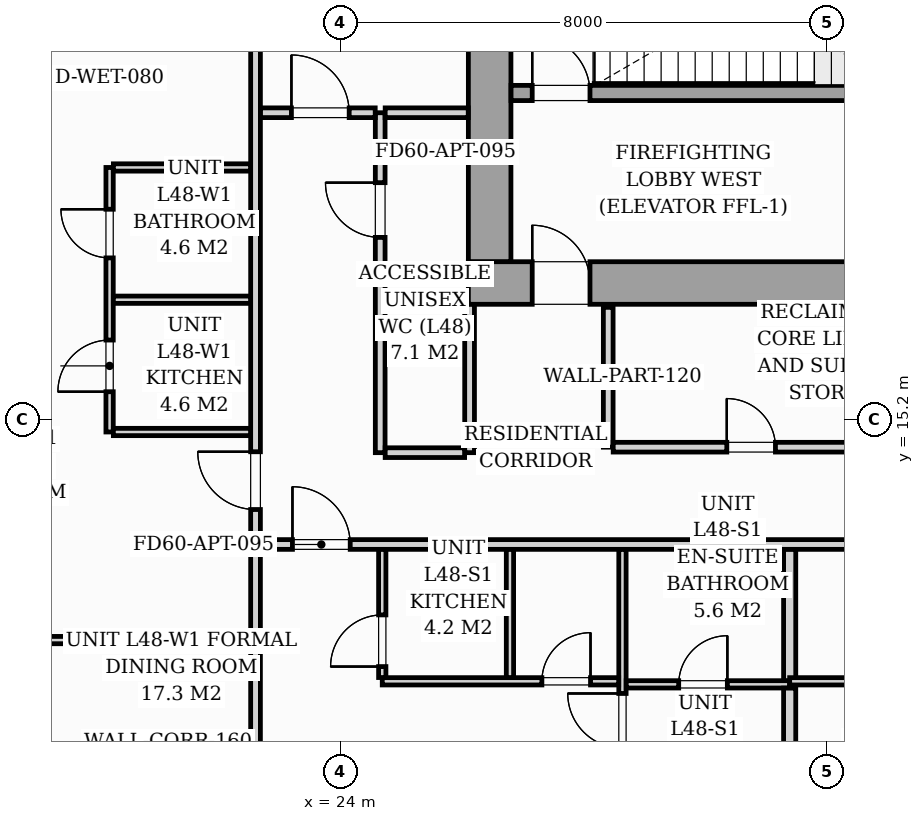
"""IFC4 building model, lengths in metres.
Left out: names, types, materials, properties, quantities, classifications, styles, units other than length and angle.
Written with IfcOpenShell. Run it as: python <this file> out.ifc"""

import sys

from ifc_helpers import new_model, si_unit, direction, frame, frame_2d, origin, origin_2d, place, context, subcontext, project, spatial, rectangle, i_section, extrude, source, transform, mapped, element, fill, save


model = new_model("IFC4")
c1 = context("Model", 3, precision=1e-05, world=origin(), true_north=direction((0.0, 1.0)))
c2 = subcontext(c1, "Body", "Model", "MODEL_VIEW")
j1 = project(units=[si_unit("LENGTHUNIT", "METRE"), si_unit("PLANEANGLEUNIT", "RADIAN")], contexts=[c1])
p1 = place(None, origin())
s1 = spatial("IfcSite", under=j1, at=p1, CompositionType="ELEMENT")
p2 = place(p1, origin())
s2 = spatial("IfcBuilding", under=s1, at=p2, CompositionType="ELEMENT")
p3 = place(p2, frame((0.0, 0.0, 167.8)))
s3 = spatial("IfcBuildingStorey", under=s2, at=p3, CompositionType="ELEMENT", Elevation=167.8)
m1 = source(origin(), c2, "Body", "SweptSolid", [
    extrude(i_section(OverallWidth=0.416, OverallDepth=0.446, WebThickness=0.039, FlangeThickness=0.063, FilletRadius=0.018, at=origin_2d()), origin(), (0.0, 0.0, 1.0), 5.196),
])
p4 = place(p3, frame((26.4, 17.4, 0.002), z_axis=(0.0, 0.0, 1.0), x_axis=(1.0, 0.0, 0.0)))
e1 = element("IfcColumn", 1, at=p4, inside=s3, PredefinedType="PILASTER", context=c2, shape_type="MappedRepresentation", body=[
    mapped(m1, transform((0.0, 0.0, 0.0), scale=1.0)),
])
p5 = place(p3, frame((26.1, 17.45, 0.0), z_axis=(0.0, 0.0, 1.0), x_axis=(1.0, 0.0, 0.0)))
e2 = element("IfcWall", 2, at=p5, inside=s3, PredefinedType="SHEAR", context=c2, shape_type="SweptSolid", body=[
    extrude(rectangle(XDim=19.8, YDim=0.7, at=frame_2d((9.9, 0.0))), origin(), (0.0, 0.0, 1.0), 5.2),
])
p6 = place(p5, frame((1.05, 0.0, 0.0)))
e3 = element("IfcOpeningElement", 3, at=p6, cuts=e2, PredefinedType="OPENING", context=c2, shape_type="SweptSolid", body=[
    extrude(rectangle(XDim=0.95, YDim=2.06, at=frame_2d((0.475, 1.03))), frame((0.0, 0.36, 0.0), z_axis=(0.0, -1.0, 0.0), x_axis=(1.0, 0.0, 0.0)), (0.0, 0.0, 1.0), 0.72),
])
p7 = place(p5, frame((9.48, 0.0, 0.0)))
e4 = element("IfcOpeningElement", 4, at=p7, cuts=e2, PredefinedType="OPENING", context=c2, shape_type="SweptSolid", body=[
    extrude(rectangle(XDim=0.9, YDim=2.06, at=frame_2d((0.45, 1.03))), frame((0.0, 0.36, 0.0), z_axis=(0.0, -1.0, 0.0), x_axis=(1.0, 0.0, 0.0)), (0.0, 0.0, 1.0), 0.72),
])
p8 = place(p5, frame((17.65, 0.0, 0.0)))
e5 = element("IfcOpeningElement", 5, at=p8, cuts=e2, PredefinedType="OPENING", context=c2, shape_type="SweptSolid", body=[
    extrude(rectangle(XDim=0.95, YDim=2.06, at=frame_2d((0.475, 1.03))), frame((0.0, 0.36, 0.0), z_axis=(0.0, -1.0, 0.0), x_axis=(1.0, 0.0, 0.0)), (0.0, 0.0, 1.0), 0.72),
])
p9 = place(p3, frame((26.45, 17.802, 0.0), z_axis=(0.0, 0.0, 1.0), x_axis=(0.0, 1.0, 0.0)))
e6 = element("IfcWall", 6, at=p9, inside=s3, PredefinedType="SHEAR", context=c2, shape_type="SweptSolid", body=[
    extrude(rectangle(XDim=5.796, YDim=0.7, at=frame_2d((2.898, 0.0))), origin(), (0.0, 0.0, 1.0), 5.2),
])
p10 = place(p3, frame((26.802, 20.575, 0.0), z_axis=(0.0, 0.0, 1.0), x_axis=(1.0, 0.0, 0.0)))
e7 = element("IfcWall", 7, at=p10, inside=s3, PredefinedType="SOLIDWALL", context=c2, shape_type="SweptSolid", body=[
    extrude(rectangle(XDim=8.148, YDim=0.25, at=frame_2d((4.074, 0.0))), origin(), (0.0, 0.0, 1.0), 5.2),
])
p11 = place(p10, frame((0.348, 0.0, 0.0)))
e8 = element("IfcOpeningElement", 8, at=p11, cuts=e7, PredefinedType="OPENING", context=c2, shape_type="SweptSolid", body=[
    extrude(rectangle(XDim=0.95, YDim=2.06, at=frame_2d((0.475, 1.03))), frame((0.0, 0.135, 0.0), z_axis=(0.0, -1.0, 0.0), x_axis=(1.0, 0.0, 0.0)), (0.0, 0.0, 1.0), 0.27),
])
p12 = place(p3, frame((28.4, 14.75, 0.0), z_axis=(0.0, 0.0, 1.0), x_axis=(0.0, 1.0, 0.0)))
e9 = element("IfcWall", 9, at=p12, inside=s3, PredefinedType="PARTITIONING", context=c2, shape_type="SweptSolid", body=[
    extrude(rectangle(XDim=2.3, YDim=0.16, at=frame_2d((1.15, 0.0))), origin(), (0.0, 0.0, 1.0), 4.94),
])
p13 = place(p3, frame((28.482, 14.75, 0.0), z_axis=(0.0, 0.0, 1.0), x_axis=(1.0, 0.0, 0.0)))
e10 = element("IfcWall", 10, at=p13, inside=s3, PredefinedType="PARTITIONING", context=c2, shape_type="SweptSolid", body=[
    extrude(rectangle(XDim=4.516, YDim=0.16, at=frame_2d((2.258, 0.0))), origin(), (0.0, 0.0, 1.0), 4.94),
])
p14 = place(p13, frame((1.868, 0.0, 0.0)))
e11 = element("IfcOpeningElement", 11, at=p14, cuts=e10, PredefinedType="OPENING", context=c2, shape_type="SweptSolid", body=[
    extrude(rectangle(XDim=0.8, YDim=2.05, at=frame_2d((0.4, 1.025))), frame((0.0, 0.09, 0.0), z_axis=(0.0, -1.0, 0.0), x_axis=(1.0, 0.0, 0.0)), (0.0, 0.0, 1.0), 0.18),
])
p15 = place(p3, frame((22.6, 13.15, 0.0), z_axis=(0.0, 0.0, 1.0), x_axis=(1.0, 0.0, 0.0)))
e12 = element("IfcWall", 12, at=p15, inside=s3, PredefinedType="PARTITIONING", context=c2, shape_type="SweptSolid", body=[
    extrude(rectangle(XDim=23.28, YDim=0.16, at=frame_2d((11.64, 0.0))), origin(), (0.0, 0.0, 1.0), 4.94),
])
p16 = place(p15, frame((0.607, 0.0, 0.0)))
e13 = element("IfcOpeningElement", 13, at=p16, cuts=e12, PredefinedType="OPENING", context=c2, shape_type="SweptSolid", body=[
    extrude(rectangle(XDim=0.95, YDim=2.06, at=frame_2d((0.475, 1.03))), frame((0.0, 0.09, 0.0), z_axis=(0.0, -1.0, 0.0), x_axis=(1.0, 0.0, 0.0)), (0.0, 0.0, 1.0), 0.18),
])
p17 = place(p15, frame((11.717, 0.0, 0.0)))
e14 = element("IfcOpeningElement", 14, at=p17, cuts=e12, PredefinedType="OPENING", context=c2, shape_type="SweptSolid", body=[
    extrude(rectangle(XDim=0.95, YDim=2.06, at=frame_2d((0.475, 1.03))), frame((0.0, 0.09, 0.0), z_axis=(0.0, -1.0, 0.0), x_axis=(1.0, 0.0, 0.0)), (0.0, 0.0, 1.0), 0.18),
])
p18 = place(p3, frame((22.6, 6.74, 0.0), z_axis=(0.0, 0.0, 1.0), x_axis=(0.0, 1.0, 0.0)))
e15 = element("IfcWall", 15, at=p18, inside=s3, PredefinedType="PARTITIONING", context=c2, shape_type="SweptSolid", body=[
    extrude(rectangle(XDim=6.329, YDim=0.16, at=frame_2d((3.164, 0.0))), origin(), (0.0, 0.0, 1.0), 4.94),
])
p19 = place(p3, frame((22.6, 13.232, 0.0), z_axis=(0.0, 0.0, 1.0), x_axis=(0.0, 1.0, 0.0)))
e16 = element("IfcWall", 16, at=p19, inside=s3, PredefinedType="PARTITIONING", context=c2, shape_type="SweptSolid", body=[
    extrude(rectangle(XDim=11.832, YDim=0.16, at=frame_2d((5.916, 0.0))), origin(), (0.0, 0.0, 1.0), 4.94),
])
p20 = place(p19, frame((0.493, 0.0, 0.0)))
e17 = element("IfcOpeningElement", 17, at=p20, cuts=e16, PredefinedType="OPENING", context=c2, shape_type="SweptSolid", body=[
    extrude(rectangle(XDim=0.95, YDim=2.06, at=frame_2d((0.475, 1.03))), frame((0.0, 0.09, 0.0), z_axis=(0.0, -1.0, 0.0), x_axis=(1.0, 0.0, 0.0)), (0.0, 0.0, 1.0), 0.18),
])
p21 = place(p3, frame((28.634, 7.503, 0.0), z_axis=(0.0, 0.0, 1.0), x_axis=(0.0, 1.0, 0.0)))
e18 = element("IfcWall", 18, at=p21, inside=s3, PredefinedType="PARTITIONING", context=c2, shape_type="SweptSolid", body=[
    extrude(rectangle(XDim=5.565, YDim=0.12, at=frame_2d((2.782, 0.0))), origin(), (0.0, 0.0, 1.0), 4.94),
])
p22 = place(p21, frame((2.297, 0.0, 0.0)))
e19 = element("IfcOpeningElement", 19, at=p22, cuts=e18, PredefinedType="OPENING", context=c2, shape_type="SweptSolid", body=[
    extrude(rectangle(XDim=0.9, YDim=2.05, at=frame_2d((0.45, 1.025))), frame((0.0, 0.07, 0.0), z_axis=(0.0, -1.0, 0.0), x_axis=(1.0, 0.0, 0.0)), (0.0, 0.0, 1.0), 0.14),
])
p23 = place(p3, frame((24.684, 10.9, 0.0), z_axis=(0.0, 0.0, 1.0), x_axis=(1.0, 0.0, 0.0)))
e20 = element("IfcWall", 20, at=p23, inside=s3, PredefinedType="PARTITIONING", context=c2, shape_type="SweptSolid", body=[
    extrude(rectangle(XDim=3.888, YDim=0.12, at=frame_2d((1.944, 0.0))), origin(), (0.0, 0.0, 1.0), 4.94),
])
p24 = place(p23, frame((2.625, 0.0, 0.0)))
e21 = element("IfcOpeningElement", 21, at=p24, cuts=e20, PredefinedType="OPENING", context=c2, shape_type="SweptSolid", body=[
    extrude(rectangle(XDim=0.8, YDim=2.02, at=frame_2d((0.4, 1.01))), frame((0.0, 0.07, 0.0), z_axis=(0.0, -1.0, 0.0), x_axis=(1.0, 0.0, 0.0)), (0.0, 0.0, 1.0), 0.14),
])
p25 = place(p3, frame((26.784, 10.962, 0.0), z_axis=(0.0, 0.0, 1.0), x_axis=(0.0, 1.0, 0.0)))
e22 = element("IfcWall", 22, at=p25, inside=s3, PredefinedType="PARTITIONING", context=c2, shape_type="SweptSolid", body=[
    extrude(rectangle(XDim=2.106, YDim=0.12, at=frame_2d((1.053, 0.0))), origin(), (0.0, 0.0, 1.0), 4.94),
])
p26 = place(p3, frame((24.684, 10.962, 0.0), z_axis=(0.0, 0.0, 1.0), x_axis=(0.0, 1.0, 0.0)))
e23 = element("IfcWall", 23, at=p26, inside=s3, PredefinedType="PARTITIONING", context=c2, shape_type="SweptSolid", body=[
    extrude(rectangle(XDim=2.106, YDim=0.12, at=frame_2d((1.053, 0.0))), origin(), (0.0, 0.0, 1.0), 4.94),
])
p27 = place(p26, frame((0.18, 0.0, 0.0)))
e24 = element("IfcOpeningElement", 24, at=p27, cuts=e23, PredefinedType="OPENING", context=c2, shape_type="SweptSolid", body=[
    extrude(rectangle(XDim=0.85, YDim=2.05, at=frame_2d((0.425, 1.025))), frame((0.0, 0.07, 0.0), z_axis=(0.0, -1.0, 0.0), x_axis=(1.0, 0.0, 0.0)), (0.0, 0.0, 1.0), 0.14),
])
p28 = place(p3, frame((28.696, 10.85, 0.0), z_axis=(0.0, 0.0, 1.0), x_axis=(1.0, 0.0, 0.0)))
e25 = element("IfcWall", 25, at=p28, inside=s3, PredefinedType="PARTITIONING", context=c2, shape_type="SweptSolid", body=[
    extrude(rectangle(XDim=2.688, YDim=0.12, at=frame_2d((1.344, 0.0))), origin(), (0.0, 0.0, 1.0), 4.94),
])
p29 = place(p28, frame((0.863, 0.0, 0.0)))
e26 = element("IfcOpeningElement", 26, at=p29, cuts=e25, PredefinedType="OPENING", context=c2, shape_type="SweptSolid", body=[
    extrude(rectangle(XDim=0.8, YDim=2.02, at=frame_2d((0.4, 1.01))), frame((0.0, 0.07, 0.0), z_axis=(0.0, -1.0, 0.0), x_axis=(1.0, 0.0, 0.0)), (0.0, 0.0, 1.0), 0.14),
])
p30 = place(p3, frame((31.384, 7.768, 0.0), z_axis=(0.0, 0.0, 1.0), x_axis=(0.0, 1.0, 0.0)))
e27 = element("IfcWall", 27, at=p30, inside=s3, PredefinedType="PARTITIONING", context=c2, shape_type="SweptSolid", body=[
    extrude(rectangle(XDim=3.02, YDim=0.2, at=frame_2d((1.51, 0.0))), origin(), (0.0, 0.0, 1.0), 4.94),
])
p31 = place(p3, frame((31.384, 10.912, 0.0), z_axis=(0.0, 0.0, 1.0), x_axis=(0.0, 1.0, 0.0)))
e28 = element("IfcWall", 28, at=p31, inside=s3, PredefinedType="PARTITIONING", context=c2, shape_type="SweptSolid", body=[
    extrude(rectangle(XDim=2.156, YDim=0.2, at=frame_2d((1.078, 0.0))), origin(), (0.0, 0.0, 1.0), 4.94),
])
p32 = place(p3, frame((31.384, 10.9, 0.0), z_axis=(0.0, 0.0, 1.0), x_axis=(1.0, 0.0, 0.0)))
e29 = element("IfcWall", 29, at=p32, inside=s3, PredefinedType="PARTITIONING", context=c2, shape_type="SweptSolid", body=[
    extrude(rectangle(XDim=2.949, YDim=0.12, at=frame_2d((1.475, 0.0))), origin(), (0.0, 0.0, 1.0), 4.94),
])
p33 = place(p3, frame((20.2, 15.0, 0.0), z_axis=(0.0, 0.0, 1.0), x_axis=(0.0, 1.0, 0.0)))
e30 = element("IfcWall", 30, at=p33, inside=s3, PredefinedType="PARTITIONING", context=c2, shape_type="SweptSolid", body=[
    extrude(rectangle(XDim=4.35, YDim=0.12, at=frame_2d((2.175, 0.0))), origin(), (0.0, 0.0, 1.0), 4.94),
])
p34 = place(p33, frame((0.662, 0.0, 0.0)))
e31 = element("IfcOpeningElement", 31, at=p34, cuts=e30, PredefinedType="OPENING", context=c2, shape_type="SweptSolid", body=[
    extrude(rectangle(XDim=0.85, YDim=2.05, at=frame_2d((0.425, 1.025))), frame((0.0, 0.07, 0.0), z_axis=(0.0, -1.0, 0.0), x_axis=(1.0, 0.0, 0.0)), (0.0, 0.0, 1.0), 0.14),
])
p35 = place(p33, frame((2.863, 0.0, 0.0)))
e32 = element("IfcOpeningElement", 32, at=p35, cuts=e30, PredefinedType="OPENING", context=c2, shape_type="SweptSolid", body=[
    extrude(rectangle(XDim=0.8, YDim=2.02, at=frame_2d((0.4, 1.01))), frame((0.0, 0.07, 0.0), z_axis=(0.0, -1.0, 0.0), x_axis=(1.0, 0.0, 0.0)), (0.0, 0.0, 1.0), 0.14),
])
for number, where, z_axis, x_axis in (
    (33, (20.262, 17.175, 0.0), (0.0, 0.0, 1.0), (1.0, 0.0, 0.0)),
    (34, (20.262, 15.0, 0.0), (0.0, 0.0, 1.0), (1.0, 0.0, 0.0)),
    (35, (20.262, 19.35, 0.0), (0.0, 0.0, 1.0), (1.0, 0.0, 0.0)),
):
    element("IfcWall", number, at=place(p3, frame(where, z_axis=z_axis, x_axis=x_axis)), inside=s3, PredefinedType="PARTITIONING", context=c2, shape_type="SweptSolid", body=[
        extrude(rectangle(XDim=2.256, YDim=0.12, at=frame_2d((1.128, 0.0))), origin(), (0.0, 0.0, 1.0), 4.94),
    ])
p36 = place(p3, frame((14.416, 11.578, 0.0), z_axis=(0.0, 0.0, 1.0), x_axis=(1.0, 0.0, 0.0)))
e36 = element("IfcWall", 36, at=p36, inside=s3, PredefinedType="PARTITIONING", context=c2, shape_type="SweptSolid", body=[
    extrude(rectangle(XDim=8.103, YDim=0.12, at=frame_2d((4.051, 0.0))), origin(), (0.0, 0.0, 1.0), 4.94),
])
p37 = place(p36, frame((3.529, 0.0, 0.0)))
e37 = element("IfcOpeningElement", 37, at=p37, cuts=e36, PredefinedType="OPENING", context=c2, shape_type="SweptSolid", body=[
    extrude(rectangle(XDim=0.85, YDim=2.05, at=frame_2d((0.425, 1.025))), frame((0.0, 0.07, 0.0), z_axis=(0.0, -1.0, 0.0), x_axis=(1.0, 0.0, 0.0)), (0.0, 0.0, 1.0), 0.14),
])
p38 = place(p3, frame((24.65, 14.66, 0.0), z_axis=(0.0, 0.0, 1.0), x_axis=(0.0, 1.0, 0.0)))
e38 = element("IfcWall", 38, at=p38, inside=s3, PredefinedType="PARTITIONING", context=c2, shape_type="SweptSolid", body=[
    extrude(rectangle(XDim=5.59, YDim=0.16, at=frame_2d((2.795, 0.0))), origin(), (0.0, 0.0, 1.0), 4.94),
])
p39 = place(p38, frame((3.54, 0.0, 0.0)))
e39 = element("IfcOpeningElement", 39, at=p39, cuts=e38, PredefinedType="OPENING", context=c2, shape_type="SweptSolid", body=[
    extrude(rectangle(XDim=0.9, YDim=2.05, at=frame_2d((0.45, 1.025))), frame((0.0, 0.09, 0.0), z_axis=(0.0, -1.0, 0.0), x_axis=(1.0, 0.0, 0.0)), (0.0, 0.0, 1.0), 0.18),
])
p40 = place(p3, frame((22.682, 20.25, 0.0), z_axis=(0.0, 0.0, 1.0), x_axis=(1.0, 0.0, 0.0)))
e40 = element("IfcWall", 40, at=p40, inside=s3, PredefinedType="PARTITIONING", context=c2, shape_type="SweptSolid", body=[
    extrude(rectangle(XDim=1.886, YDim=0.16, at=frame_2d((0.943, 0.0))), origin(), (0.0, 0.0, 1.0), 4.94),
])
p41 = place(p40, frame((0.508, 0.0, 0.0)))
e41 = element("IfcOpeningElement", 41, at=p41, cuts=e40, PredefinedType="OPENING", context=c2, shape_type="SweptSolid", body=[
    extrude(rectangle(XDim=0.95, YDim=2.06, at=frame_2d((0.475, 1.03))), frame((0.0, 0.09, 0.0), z_axis=(0.0, -1.0, 0.0), x_axis=(1.0, 0.0, 0.0)), (0.0, 0.0, 1.0), 0.18),
])
p42 = place(p3, frame((24.732, 20.25, 0.0), z_axis=(0.0, 0.0, 1.0), x_axis=(1.0, 0.0, 0.0)))
e42 = element("IfcWall", 42, at=p42, inside=s3, PredefinedType="PARTITIONING", context=c2, shape_type="SweptSolid", body=[
    extrude(rectangle(XDim=1.366, YDim=0.16, at=frame_2d((0.683, 0.0))), origin(), (0.0, 0.0, 1.0), 4.94),
])
p43 = place(p3, frame((26.12, 14.66, 0.0), z_axis=(0.0, 0.0, 1.0), x_axis=(0.0, 1.0, 0.0)))
e43 = element("IfcWall", 43, at=p43, inside=s3, PredefinedType="PARTITIONING", context=c2, shape_type="SweptSolid", body=[
    extrude(rectangle(XDim=2.438, YDim=0.16, at=frame_2d((1.219, 0.0))), origin(), (0.0, 0.0, 1.0), 4.94),
])
p44 = place(p3, frame((24.732, 14.66, 0.0), z_axis=(0.0, 0.0, 1.0), x_axis=(1.0, 0.0, 0.0)))
e44 = element("IfcWall", 44, at=p44, inside=s3, PredefinedType="PARTITIONING", context=c2, shape_type="SweptSolid", body=[
    extrude(rectangle(XDim=1.306, YDim=0.16, at=frame_2d((0.653, 0.0))), origin(), (0.0, 0.0, 1.0), 4.94),
])
m2 = source(origin(), c2, "Body", "SweptSolid", [
    extrude(rectangle(XDim=0.95, YDim=2.06, at=frame_2d((0.475, 1.03))), frame((0.0, 0.025, 0.0), z_axis=(0.0, -1.0, 0.0), x_axis=(1.0, 0.0, 0.0)), (0.0, 0.0, 1.0), 0.05),
])
p45 = place(p6, origin())
e45 = element("IfcDoor", 45, at=p45, inside=s3, OperationType="SINGLE_SWING_LEFT", PredefinedType="DOOR", context=c2, shape_type="MappedRepresentation", body=[
    mapped(m2, transform((0.0, 0.0, 0.0), scale=1.0)),
])
fill(e3, e45)
p46 = place(p11, origin())
e46 = element("IfcDoor", 46, at=p46, inside=s3, OperationType="SINGLE_SWING_LEFT", PredefinedType="DOOR", context=c2, shape_type="MappedRepresentation", body=[
    mapped(m2, transform((0.0, 0.0, 0.0), scale=1.0)),
])
fill(e8, e46)
m3 = source(origin(), c2, "Body", "SweptSolid", [
    extrude(rectangle(XDim=0.8, YDim=2.05, at=frame_2d((0.4, 1.025))), frame((0.0, 0.025, 0.0), z_axis=(0.0, -1.0, 0.0), x_axis=(1.0, 0.0, 0.0)), (0.0, 0.0, 1.0), 0.05),
])
p47 = place(p14, origin())
e47 = element("IfcDoor", 47, at=p47, inside=s3, OperationType="SINGLE_SWING_LEFT", PredefinedType="DOOR", context=c2, shape_type="MappedRepresentation", body=[
    mapped(m3, transform((0.0, 0.0, 0.0), scale=1.0)),
])
fill(e11, e47)
m4 = source(origin(), c2, "Body", "SweptSolid", [
    extrude(rectangle(XDim=0.8, YDim=2.02, at=frame_2d((0.4, 1.01))), frame((0.0, 0.025, 0.0), z_axis=(0.0, -1.0, 0.0), x_axis=(1.0, 0.0, 0.0)), (0.0, 0.0, 1.0), 0.05),
])
p48 = place(p29, origin())
e48 = element("IfcDoor", 48, at=p48, inside=s3, OperationType="SINGLE_SWING_RIGHT", PredefinedType="DOOR", context=c2, shape_type="MappedRepresentation", body=[
    mapped(m4, transform((0.0, 0.0, 0.0), scale=1.0)),
])
fill(e26, e48)
m5 = source(origin(), c2, "Body", "SweptSolid", [
    extrude(rectangle(XDim=0.95, YDim=2.06, at=frame_2d((0.475, 1.03))), frame((0.0, 0.025, 0.0), z_axis=(0.0, -1.0, 0.0), x_axis=(1.0, 0.0, 0.0)), (0.0, 0.0, 1.0), 0.05),
])
p49 = place(p16, origin())
e49 = element("IfcDoor", 49, at=p49, inside=s3, OperationType="SINGLE_SWING_LEFT", PredefinedType="DOOR", context=c2, shape_type="MappedRepresentation", body=[
    mapped(m5, transform((0.0, 0.0, 0.0), scale=1.0)),
])
fill(e13, e49)
m6 = source(origin(), c2, "Body", "SweptSolid", [
    extrude(rectangle(XDim=0.9, YDim=2.05, at=frame_2d((0.45, 1.025))), frame((0.0, 0.025, 0.0), z_axis=(0.0, -1.0, 0.0), x_axis=(1.0, 0.0, 0.0)), (0.0, 0.0, 1.0), 0.05),
])
p50 = place(p22, origin())
e50 = element("IfcDoor", 50, at=p50, inside=s3, OperationType="SINGLE_SWING_RIGHT", PredefinedType="DOOR", context=c2, shape_type="MappedRepresentation", body=[
    mapped(m6, transform((0.0, 0.0, 0.0), scale=1.0)),
])
fill(e19, e50)
m7 = source(origin(), c2, "Body", "SweptSolid", [
    extrude(rectangle(XDim=0.85, YDim=2.05, at=frame_2d((0.425, 1.025))), frame((0.0, 0.025, 0.0), z_axis=(0.0, -1.0, 0.0), x_axis=(1.0, 0.0, 0.0)), (0.0, 0.0, 1.0), 0.05),
])
p51 = place(p27, origin())
e51 = element("IfcDoor", 51, at=p51, inside=s3, OperationType="SINGLE_SWING_LEFT", PredefinedType="DOOR", context=c2, shape_type="MappedRepresentation", body=[
    mapped(m7, transform((0.0, 0.0, 0.0), scale=1.0)),
])
fill(e24, e51)
p52 = place(p24, origin())
e52 = element("IfcDoor", 52, at=p52, inside=s3, OperationType="SINGLE_SWING_RIGHT", PredefinedType="DOOR", context=c2, shape_type="MappedRepresentation", body=[
    mapped(m4, transform((0.0, 0.0, 0.0), scale=1.0)),
])
fill(e21, e52)
p53 = place(p20, origin())
e53 = element("IfcDoor", 53, at=p53, inside=s3, OperationType="SINGLE_SWING_RIGHT", PredefinedType="DOOR", context=c2, shape_type="MappedRepresentation", body=[
    mapped(m5, transform((0.0, 0.0, 0.0), scale=1.0)),
])
fill(e17, e53)
p54 = place(p34, origin())
e54 = element("IfcDoor", 54, at=p54, inside=s3, OperationType="SINGLE_SWING_LEFT", PredefinedType="DOOR", context=c2, shape_type="MappedRepresentation", body=[
    mapped(m7, transform((0.0, 0.0, 0.0), scale=1.0)),
])
fill(e31, e54)
p55 = place(p35, origin())
e55 = element("IfcDoor", 55, at=p55, inside=s3, OperationType="SINGLE_SWING_RIGHT", PredefinedType="DOOR", context=c2, shape_type="MappedRepresentation", body=[
    mapped(m4, transform((0.0, 0.0, 0.0), scale=1.0)),
])
fill(e32, e55)
p56 = place(p39, origin())
e56 = element("IfcDoor", 56, at=p56, inside=s3, OperationType="SINGLE_SWING_RIGHT", PredefinedType="DOOR", context=c2, shape_type="MappedRepresentation", body=[
    mapped(m6, transform((0.0, 0.0, 0.0), scale=1.0)),
])
fill(e39, e56)
p57 = place(p41, origin())
e57 = element("IfcDoor", 57, at=p57, inside=s3, OperationType="SINGLE_SWING_LEFT", PredefinedType="DOOR", context=c2, shape_type="MappedRepresentation", body=[
    mapped(m5, transform((0.0, 0.0, 0.0), scale=1.0)),
])
fill(e41, e57)
save(model, sys.argv[1])
